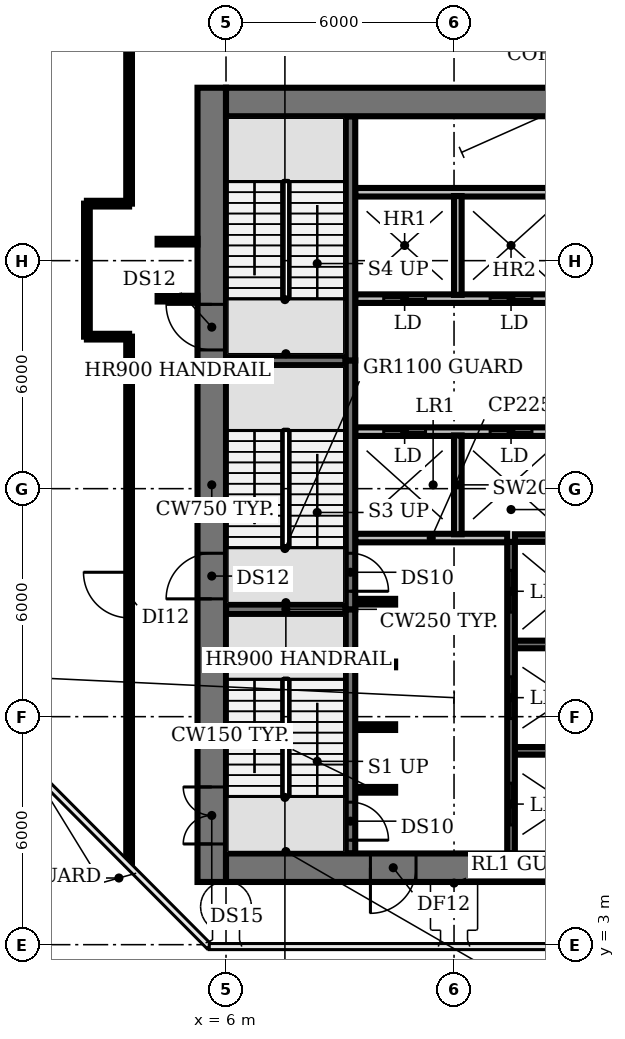
"""IFC4 building model, lengths in metres.
Left out: names, types, materials, properties, quantities, classifications, styles, units other than length and angle.
Written with IfcOpenShell. Run it as: python <this file> out.ifc"""

import sys

from ifc_helpers import new_model, si_unit, direction, frame, frame_2d, origin, place, context, subcontext, project, spatial, rectangle, extrude, element, fill, save


model = new_model("IFC4")
c1 = context("Model", 3, precision=1e-05, world=origin(), true_north=direction((0.0, 1.0)))
c2 = subcontext(c1, "Body", "Model", "MODEL_VIEW")
j1 = project(units=[si_unit("LENGTHUNIT", "METRE"), si_unit("PLANEANGLEUNIT", "RADIAN")], contexts=[c1])
p1 = place(None, origin())
s1 = spatial("IfcSite", under=j1, at=p1, CompositionType="ELEMENT")
p2 = place(p1, origin())
s2 = spatial("IfcBuilding", under=s1, at=p2, CompositionType="ELEMENT")
p3 = place(p2, frame((0.0, 0.0, 138.2)))
s3 = spatial("IfcBuildingStorey", under=s2, at=p3, CompositionType="ELEMENT", Elevation=138.2)
p4 = place(p3, frame((9.4, 7.075, 0.0), z_axis=(0.0, 0.0, 1.0), x_axis=(1.0, 0.0, 0.0)))
e1 = element("IfcWall", 1, at=p4, inside=s3, PredefinedType="SHEAR", context=c2, shape_type="SweptSolid", body=[
    extrude(rectangle(XDim=1.05, YDim=0.15, at=frame_2d((0.525, 0.0))), origin(), (0.0, 0.0, 1.0), 8.05),
])
p5 = place(p3, frame((13.6, 8.1, 0.0), z_axis=(0.0, 0.0, 1.0), x_axis=(1.0, 0.0, 0.0)))
e2 = element("IfcWall", 2, at=p5, inside=s3, PredefinedType="SHEAR", context=c2, shape_type="SweptSolid", body=[
    extrude(rectangle(XDim=2.8, YDim=0.2, at=frame_2d((1.4, 0.0))), origin(), (0.0, 0.0, 1.0), 8.05),
])
for number, where, z_axis, x_axis in (
    (3, (9.4, 8.725, 0.0), (0.0, 0.0, 1.0), (1.0, 0.0, 0.0)),
    (4, (9.4, 10.375, 0.0), (0.0, 0.0, 1.0), (1.0, 0.0, 0.0)),
):
    element("IfcWall", number, at=place(p3, frame(where, z_axis=z_axis, x_axis=x_axis)), inside=s3, PredefinedType="SHEAR", context=c2, shape_type="SweptSolid", body=[
        extrude(rectangle(XDim=1.05, YDim=0.15, at=frame_2d((0.525, 0.0))), origin(), (0.0, 0.0, 1.0), 8.05),
    ])
p6 = place(p3, frame((13.6, 10.9, 0.0), z_axis=(0.0, 0.0, 1.0), x_axis=(1.0, 0.0, 0.0)))
e5 = element("IfcWall", 5, at=p6, inside=s3, PredefinedType="SHEAR", context=c2, shape_type="SweptSolid", body=[
    extrude(rectangle(XDim=2.8, YDim=0.2, at=frame_2d((1.4, 0.0))), origin(), (0.0, 0.0, 1.0), 8.05),
])
p7 = place(p3, frame((6.0, 11.825, 0.0), z_axis=(0.0, 0.0, 1.0), x_axis=(1.0, 0.0, 0.0)))
e6 = element("IfcWall", 6, at=p7, inside=s3, PredefinedType="SHEAR", context=c2, shape_type="SweptSolid", body=[
    extrude(rectangle(XDim=3.15, YDim=0.25, at=frame_2d((1.575, 0.0))), origin(), (0.0, 0.0, 1.0), 8.05),
])
p8 = place(p3, frame((9.4, 12.025, 0.0), z_axis=(0.0, 0.0, 1.0), x_axis=(1.0, 0.0, 0.0)))
e7 = element("IfcWall", 7, at=p8, inside=s3, PredefinedType="SHEAR", context=c2, shape_type="SweptSolid", body=[
    extrude(rectangle(XDim=1.05, YDim=0.15, at=frame_2d((0.525, 0.0))), origin(), (0.0, 0.0, 1.0), 8.05),
])
p9 = place(p3, frame((9.4, 13.7, 0.0), z_axis=(0.0, 0.0, 1.0), x_axis=(1.0, 0.0, 0.0)))
e8 = element("IfcWall", 8, at=p9, inside=s3, PredefinedType="PARTITIONING", context=c2, shape_type="SweptSolid", body=[
    extrude(rectangle(XDim=4.0, YDim=0.225, at=frame_2d((2.0, 0.0))), origin(), (0.0, 0.0, 1.0), 8.05),
])
p10 = place(p3, frame((13.6, 13.7, 0.0), z_axis=(0.0, 0.0, 1.0), x_axis=(1.0, 0.0, 0.0)))
e9 = element("IfcWall", 9, at=p10, inside=s3, PredefinedType="SHEAR", context=c2, shape_type="SweptSolid", body=[
    extrude(rectangle(XDim=2.8, YDim=0.2, at=frame_2d((1.4, 0.0))), origin(), (0.0, 0.0, 1.0), 8.05),
])
p11 = place(p3, frame((9.4, 16.5, 0.0), z_axis=(0.0, 0.0, 1.0), x_axis=(1.0, 0.0, 0.0)))
e10 = element("IfcWall", 10, at=p11, inside=s3, PredefinedType="PARTITIONING", context=c2, shape_type="SweptSolid", body=[
    extrude(rectangle(XDim=14.6, YDim=0.225, at=frame_2d((7.3, 0.0))), origin(), (0.0, 0.0, 1.0), 8.05),
])
p12 = place(p11, frame((0.75, 0.0, 0.0)))
e11 = element("IfcOpeningElement", 11, at=p12, cuts=e10, PredefinedType="OPENING", context=c2, shape_type="SweptSolid", body=[
    extrude(rectangle(XDim=1.1, YDim=2.1, at=frame_2d((0.55, 1.05))), frame((0.0, 0.123, 0.0), z_axis=(0.0, -1.0, 0.0), x_axis=(1.0, 0.0, 0.0)), (0.0, 0.0, 1.0), 0.245),
])
p13 = place(p11, frame((3.55, 0.0, 0.0)))
e12 = element("IfcOpeningElement", 12, at=p13, cuts=e10, PredefinedType="OPENING", context=c2, shape_type="SweptSolid", body=[
    extrude(rectangle(XDim=1.1, YDim=2.1, at=frame_2d((0.55, 1.05))), frame((0.0, 0.123, 0.0), z_axis=(0.0, -1.0, 0.0), x_axis=(1.0, 0.0, 0.0)), (0.0, 0.0, 1.0), 0.245),
])
p14 = place(p11, frame((6.35, 0.0, 0.0)))
e13 = element("IfcOpeningElement", 13, at=p14, cuts=e10, PredefinedType="OPENING", context=c2, shape_type="SweptSolid", body=[
    extrude(rectangle(XDim=1.1, YDim=2.1, at=frame_2d((0.55, 1.05))), frame((0.0, 0.123, 0.0), z_axis=(0.0, -1.0, 0.0), x_axis=(1.0, 0.0, 0.0)), (0.0, 0.0, 1.0), 0.245),
])
p15 = place(p11, frame((9.15, 0.0, 0.0)))
e14 = element("IfcOpeningElement", 14, at=p15, cuts=e10, PredefinedType="OPENING", context=c2, shape_type="SweptSolid", body=[
    extrude(rectangle(XDim=1.1, YDim=2.1, at=frame_2d((0.55, 1.05))), frame((0.0, 0.123, 0.0), z_axis=(0.0, -1.0, 0.0), x_axis=(1.0, 0.0, 0.0)), (0.0, 0.0, 1.0), 0.245),
])
p16 = place(p11, frame((12.4, 0.0, 0.0)))
e15 = element("IfcOpeningElement", 15, at=p16, cuts=e10, PredefinedType="OPENING", context=c2, shape_type="SweptSolid", body=[
    extrude(rectangle(XDim=1.0, YDim=2.1, at=frame_2d((0.5, 1.05))), frame((0.0, 0.123, 0.0), z_axis=(0.0, -1.0, 0.0), x_axis=(1.0, 0.0, 0.0)), (0.0, 0.0, 1.0), 0.245),
])
p17 = place(p3, frame((6.0, 18.375, 0.0), z_axis=(0.0, 0.0, 1.0), x_axis=(1.0, 0.0, 0.0)))
e16 = element("IfcWall", 16, at=p17, inside=s3, PredefinedType="SHEAR", context=c2, shape_type="SweptSolid", body=[
    extrude(rectangle(XDim=3.15, YDim=0.25, at=frame_2d((1.575, 0.0))), origin(), (0.0, 0.0, 1.0), 8.05),
])
p18 = place(p3, frame((24.0, 20.0, 0.0), z_axis=(0.0, 0.0, 1.0), x_axis=(-1.0, 0.0, 0.0)))
e17 = element("IfcWall", 17, at=p18, inside=s3, PredefinedType="PARTITIONING", context=c2, shape_type="SweptSolid", body=[
    extrude(rectangle(XDim=14.6, YDim=0.225, at=frame_2d((7.3, 0.0))), origin(), (0.0, 0.0, 1.0), 8.05),
])
p19 = place(p18, frame((12.75, 0.0, 0.0)))
e18 = element("IfcOpeningElement", 18, at=p19, cuts=e17, PredefinedType="OPENING", context=c2, shape_type="SweptSolid", body=[
    extrude(rectangle(XDim=1.1, YDim=2.1, at=frame_2d((0.55, 1.05))), frame((0.0, 0.123, 0.0), z_axis=(0.0, -1.0, 0.0), x_axis=(1.0, 0.0, 0.0)), (0.0, 0.0, 1.0), 0.245),
])
p20 = place(p18, frame((9.95, 0.0, 0.0)))
e19 = element("IfcOpeningElement", 19, at=p20, cuts=e17, PredefinedType="OPENING", context=c2, shape_type="SweptSolid", body=[
    extrude(rectangle(XDim=1.1, YDim=2.1, at=frame_2d((0.55, 1.05))), frame((0.0, 0.123, 0.0), z_axis=(0.0, -1.0, 0.0), x_axis=(1.0, 0.0, 0.0)), (0.0, 0.0, 1.0), 0.245),
])
p21 = place(p18, frame((7.15, 0.0, 0.0)))
e20 = element("IfcOpeningElement", 20, at=p21, cuts=e17, PredefinedType="OPENING", context=c2, shape_type="SweptSolid", body=[
    extrude(rectangle(XDim=1.1, YDim=2.1, at=frame_2d((0.55, 1.05))), frame((0.0, 0.123, 0.0), z_axis=(0.0, -1.0, 0.0), x_axis=(1.0, 0.0, 0.0)), (0.0, 0.0, 1.0), 0.245),
])
p22 = place(p18, frame((4.35, 0.0, 0.0)))
e21 = element("IfcOpeningElement", 21, at=p22, cuts=e17, PredefinedType="OPENING", context=c2, shape_type="SweptSolid", body=[
    extrude(rectangle(XDim=1.1, YDim=2.1, at=frame_2d((0.55, 1.05))), frame((0.0, 0.123, 0.0), z_axis=(0.0, -1.0, 0.0), x_axis=(1.0, 0.0, 0.0)), (0.0, 0.0, 1.0), 0.245),
])
p23 = place(p18, frame((1.2, 0.0, 0.0)))
e22 = element("IfcOpeningElement", 22, at=p23, cuts=e17, PredefinedType="OPENING", context=c2, shape_type="SweptSolid", body=[
    extrude(rectangle(XDim=1.0, YDim=2.1, at=frame_2d((0.5, 1.05))), frame((0.0, 0.123, 0.0), z_axis=(0.0, -1.0, 0.0), x_axis=(1.0, 0.0, 0.0)), (0.0, 0.0, 1.0), 0.245),
])
p24 = place(p3, frame((9.4, 22.8, 0.0), z_axis=(0.0, 0.0, 1.0), x_axis=(1.0, 0.0, 0.0)))
e23 = element("IfcWall", 23, at=p24, inside=s3, PredefinedType="PARTITIONING", context=c2, shape_type="SweptSolid", body=[
    extrude(rectangle(XDim=14.6, YDim=0.225, at=frame_2d((7.3, 0.0))), origin(), (0.0, 0.0, 1.0), 8.05),
])
p25 = place(p3, frame((9.275, 11.825, 0.0), z_axis=(0.0, 0.0, 1.0), x_axis=(0.0, -1.0, 0.0)))
e24 = element("IfcWall", 24, at=p25, inside=s3, PredefinedType="SHEAR", context=c2, shape_type="SweptSolid", body=[
    extrude(rectangle(XDim=6.425, YDim=0.25, at=frame_2d((3.212, 0.0))), origin(), (0.0, 0.0, 1.0), 8.05),
])
p26 = place(p25, frame((5.075, 0.0, 0.0)))
e25 = element("IfcOpeningElement", 25, at=p26, cuts=e24, PredefinedType="OPENING", context=c2, shape_type="SweptSolid", body=[
    extrude(rectangle(XDim=1.0, YDim=2.1, at=frame_2d((0.5, 1.05))), frame((0.0, 0.135, 0.0), z_axis=(0.0, -1.0, 0.0), x_axis=(1.0, 0.0, 0.0)), (0.0, 0.0, 1.0), 0.27),
])
p27 = place(p3, frame((9.275, 18.375, 0.0), z_axis=(0.0, 0.0, 1.0), x_axis=(0.0, -1.0, 0.0)))
e26 = element("IfcWall", 26, at=p27, inside=s3, PredefinedType="SHEAR", context=c2, shape_type="SweptSolid", body=[
    extrude(rectangle(XDim=6.55, YDim=0.25, at=frame_2d((3.275, 0.0))), origin(), (0.0, 0.0, 1.0), 8.05),
])
p28 = place(p27, frame((5.075, 0.0, 0.0)))
e27 = element("IfcOpeningElement", 27, at=p28, cuts=e26, PredefinedType="OPENING", context=c2, shape_type="SweptSolid", body=[
    extrude(rectangle(XDim=1.0, YDim=2.1, at=frame_2d((0.5, 1.05))), frame((0.0, 0.135, 0.0), z_axis=(0.0, -1.0, 0.0), x_axis=(1.0, 0.0, 0.0)), (0.0, 0.0, 1.0), 0.27),
])
p29 = place(p3, frame((9.275, 18.375, 0.0), z_axis=(0.0, 0.0, 1.0), x_axis=(0.0, 1.0, 0.0)))
e28 = element("IfcWall", 28, at=p29, inside=s3, PredefinedType="SHEAR", context=c2, shape_type="SweptSolid", body=[
    extrude(rectangle(XDim=6.425, YDim=0.25, at=frame_2d((3.212, 0.0))), origin(), (0.0, 0.0, 1.0), 8.05),
])
for number, where, z_axis, x_axis in (
    (29, (12.1, 13.8, 0.0), (0.0, 0.0, 1.0), (0.0, 1.0, 0.0)),
    (30, (12.1, 20.1, 0.0), (0.0, 0.0, 1.0), (0.0, 1.0, 0.0)),
):
    element("IfcWall", number, at=place(p3, frame(where, z_axis=z_axis, x_axis=x_axis)), inside=s3, PredefinedType="SOLIDWALL", context=c2, shape_type="SweptSolid", body=[
        extrude(rectangle(XDim=2.6, YDim=0.2, at=frame_2d((1.3, 0.0))), origin(), (0.0, 0.0, 1.0), 8.05),
    ])
p30 = place(p3, frame((13.5, 5.4, 0.0), z_axis=(0.0, 0.0, 1.0), x_axis=(0.0, 1.0, 0.0)))
e31 = element("IfcWall", 31, at=p30, inside=s3, PredefinedType="SHEAR", context=c2, shape_type="SweptSolid", body=[
    extrude(rectangle(XDim=8.2, YDim=0.2, at=frame_2d((4.1, 0.0))), origin(), (0.0, 0.0, 1.0), 8.05),
])
p31 = place(p30, frame((0.75, 0.0, 0.0)))
e32 = element("IfcOpeningElement", 32, at=p31, cuts=e31, PredefinedType="OPENING", context=c2, shape_type="SweptSolid", body=[
    extrude(rectangle(XDim=1.1, YDim=2.1, at=frame_2d((0.55, 1.05))), frame((0.0, 0.11, 0.0), z_axis=(0.0, -1.0, 0.0), x_axis=(1.0, 0.0, 0.0)), (0.0, 0.0, 1.0), 0.22),
])
p32 = place(p30, frame((3.55, 0.0, 0.0)))
e33 = element("IfcOpeningElement", 33, at=p32, cuts=e31, PredefinedType="OPENING", context=c2, shape_type="SweptSolid", body=[
    extrude(rectangle(XDim=1.1, YDim=2.1, at=frame_2d((0.55, 1.05))), frame((0.0, 0.11, 0.0), z_axis=(0.0, -1.0, 0.0), x_axis=(1.0, 0.0, 0.0)), (0.0, 0.0, 1.0), 0.22),
])
p33 = place(p30, frame((6.35, 0.0, 0.0)))
e34 = element("IfcOpeningElement", 34, at=p33, cuts=e31, PredefinedType="OPENING", context=c2, shape_type="SweptSolid", body=[
    extrude(rectangle(XDim=1.1, YDim=2.1, at=frame_2d((0.55, 1.05))), frame((0.0, 0.11, 0.0), z_axis=(0.0, -1.0, 0.0), x_axis=(1.0, 0.0, 0.0)), (0.0, 0.0, 1.0), 0.22),
])
p34 = place(p3, frame((5.625, 4.65, 0.0), z_axis=(0.0, 0.0, 1.0), x_axis=(0.0, 1.0, 0.0)))
e35 = element("IfcWall", 35, at=p34, inside=s3, PredefinedType="SHEAR", context=c2, shape_type="SweptSolid", body=[
    extrude(rectangle(XDim=20.9, YDim=0.75, at=frame_2d((10.45, 0.0))), origin(), (0.0, 0.0, 1.0), 8.05),
])
p35 = place(p34, frame((1.0, 0.0, 0.0)))
e36 = element("IfcOpeningElement", 36, at=p35, cuts=e35, PredefinedType="OPENING", context=c2, shape_type="SweptSolid", body=[
    extrude(rectangle(XDim=1.5, YDim=2.1, at=frame_2d((0.75, 1.05))), frame((0.0, 0.385, 0.0), z_axis=(0.0, -1.0, 0.0), x_axis=(1.0, 0.0, 0.0)), (0.0, 0.0, 1.0), 0.77),
])
p36 = place(p34, frame((7.45, 0.0, 0.0)))
e37 = element("IfcOpeningElement", 37, at=p36, cuts=e35, PredefinedType="OPENING", context=c2, shape_type="SweptSolid", body=[
    extrude(rectangle(XDim=1.2, YDim=2.1, at=frame_2d((0.6, 1.05))), frame((0.0, 0.385, 0.0), z_axis=(0.0, -1.0, 0.0), x_axis=(1.0, 0.0, 0.0)), (0.0, 0.0, 1.0), 0.77),
])
p37 = place(p34, frame((14.0, 0.0, 0.0)))
e38 = element("IfcOpeningElement", 38, at=p37, cuts=e35, PredefinedType="OPENING", context=c2, shape_type="SweptSolid", body=[
    extrude(rectangle(XDim=1.2, YDim=2.1, at=frame_2d((0.6, 1.05))), frame((0.0, 0.385, 0.0), z_axis=(0.0, -1.0, 0.0), x_axis=(1.0, 0.0, 0.0)), (0.0, 0.0, 1.0), 0.77),
])
p38 = place(p3, frame((24.0, 5.025, 0.0), z_axis=(0.0, 0.0, 1.0), x_axis=(-1.0, 0.0, 0.0)))
e39 = element("IfcWall", 39, at=p38, inside=s3, PredefinedType="SHEAR", context=c2, shape_type="SweptSolid", body=[
    extrude(rectangle(XDim=18.0, YDim=0.75, at=frame_2d((9.0, 0.0))), origin(), (0.0, 0.0, 1.0), 8.05),
])
p39 = place(p38, frame((13.0, 0.0, 0.0)))
e40 = element("IfcOpeningElement", 40, at=p39, cuts=e39, PredefinedType="OPENING", context=c2, shape_type="SweptSolid", body=[
    extrude(rectangle(XDim=1.2, YDim=2.1, at=frame_2d((0.6, 1.05))), frame((0.0, 0.385, 0.0), z_axis=(0.0, -1.0, 0.0), x_axis=(1.0, 0.0, 0.0)), (0.0, 0.0, 1.0), 0.77),
])
p40 = place(p38, frame((3.85, 0.0, 0.0)))
e41 = element("IfcOpeningElement", 41, at=p40, cuts=e39, PredefinedType="OPENING", context=c2, shape_type="SweptSolid", body=[
    extrude(rectangle(XDim=1.0, YDim=2.1, at=frame_2d((0.5, 1.05))), frame((0.0, 0.385, 0.0), z_axis=(0.0, -1.0, 0.0), x_axis=(1.0, 0.0, 0.0)), (0.0, 0.0, 1.0), 0.77),
])
p41 = place(p3, frame((6.0, 25.175, 0.0), z_axis=(0.0, 0.0, 1.0), x_axis=(1.0, 0.0, 0.0)))
e42 = element("IfcWall", 42, at=p41, inside=s3, PredefinedType="SHEAR", context=c2, shape_type="SweptSolid", body=[
    extrude(rectangle(XDim=18.0, YDim=0.75, at=frame_2d((9.0, 0.0))), origin(), (0.0, 0.0, 1.0), 8.05),
])
p42 = place(p3, frame((2.34, 19.0, 0.0), z_axis=(0.0, 0.0, 1.0), x_axis=(0.0, 1.0, 0.0)))
e43 = element("IfcWall", 43, at=p42, inside=s3, PredefinedType="PARTITIONING", context=c2, shape_type="SweptSolid", body=[
    extrude(rectangle(XDim=3.5, YDim=0.15, at=frame_2d((1.75, 0.0))), origin(), (0.0, 0.0, 1.0), 6.33),
])
for number, where, z_axis, x_axis in (
    (44, (2.34, 19.0, 0.0), (0.0, 0.0, 1.0), (1.0, 0.0, 0.0)),
    (45, (2.34, 22.5, 0.0), (0.0, 0.0, 1.0), (1.0, 0.0, 0.0)),
):
    element("IfcWall", number, at=place(p3, frame(where, z_axis=z_axis, x_axis=x_axis)), inside=s3, PredefinedType="PARTITIONING", context=c2, shape_type="SweptSolid", body=[
        extrude(rectangle(XDim=1.11, YDim=0.15, at=frame_2d((0.555, 0.0))), origin(), (0.0, 0.0, 1.0), 6.33),
    ])
p43 = place(p3, frame((3.45, 5.14, 0.0), z_axis=(0.0, 0.0, 1.0), x_axis=(0.0, 1.0, 0.0)))
e46 = element("IfcWall", 46, at=p43, inside=s3, PredefinedType="PARTITIONING", context=c2, shape_type="SweptSolid", body=[
    extrude(rectangle(XDim=13.86, YDim=0.15, at=frame_2d((6.93, 0.0))), origin(), (0.0, 0.0, 1.0), 6.33),
])
p44 = place(p43, frame((6.46, 0.0, 0.0)))
e47 = element("IfcOpeningElement", 47, at=p44, cuts=e46, PredefinedType="OPENING", context=c2, shape_type="SweptSolid", body=[
    extrude(rectangle(XDim=1.2, YDim=2.1, at=frame_2d((0.6, 1.05))), frame((0.0, 0.085, 0.0), z_axis=(0.0, -1.0, 0.0), x_axis=(1.0, 0.0, 0.0)), (0.0, 0.0, 1.0), 0.17),
])
p45 = place(p3, frame((3.45, 22.5, 0.0), z_axis=(0.0, 0.0, 1.0), x_axis=(0.0, 1.0, 0.0)))
e48 = element("IfcWall", 48, at=p45, inside=s3, PredefinedType="PARTITIONING", context=c2, shape_type="SweptSolid", body=[
    extrude(rectangle(XDim=4.85, YDim=0.15, at=frame_2d((2.425, 0.0))), origin(), (0.0, 0.0, 1.0), 6.33),
])
for number, where, z_axis, x_axis in (
    (49, (4.2, 20.0, 0.0), (0.0, 0.0, 1.0), (1.0, 0.0, 0.0)),
    (50, (4.2, 21.5, 0.0), (0.0, 0.0, 1.0), (1.0, 0.0, 0.0)),
):
    element("IfcWall", number, at=place(p3, frame(where, z_axis=z_axis, x_axis=x_axis)), inside=s3, PredefinedType="PARTITIONING", context=c2, shape_type="SweptSolid", body=[
        extrude(rectangle(XDim=1.05, YDim=0.15, at=frame_2d((0.525, 0.0))), origin(), (0.0, 0.0, 1.0), 6.33),
    ])
p46 = place(p12, origin())
e51 = element("IfcDoor", 51, at=p46, inside=s3, OperationType="DOUBLE_DOOR_SLIDING", PredefinedType="DOOR", context=c2, shape_type="SweptSolid", body=[
    extrude(rectangle(XDim=1.1, YDim=2.1, at=frame_2d((0.55, 1.05))), frame((0.0, 0.025, 0.0), z_axis=(0.0, -1.0, 0.0), x_axis=(1.0, 0.0, 0.0)), (0.0, 0.0, 1.0), 0.05),
])
fill(e11, e51)
p47 = place(p13, origin())
e52 = element("IfcDoor", 52, at=p47, inside=s3, OperationType="DOUBLE_DOOR_SLIDING", PredefinedType="DOOR", context=c2, shape_type="SweptSolid", body=[
    extrude(rectangle(XDim=1.1, YDim=2.1, at=frame_2d((0.55, 1.05))), frame((0.0, 0.025, 0.0), z_axis=(0.0, -1.0, 0.0), x_axis=(1.0, 0.0, 0.0)), (0.0, 0.0, 1.0), 0.05),
])
fill(e12, e52)
p48 = place(p19, origin())
e53 = element("IfcDoor", 53, at=p48, inside=s3, OperationType="DOUBLE_DOOR_SLIDING", PredefinedType="DOOR", context=c2, shape_type="SweptSolid", body=[
    extrude(rectangle(XDim=1.1, YDim=2.1, at=frame_2d((0.55, 1.05))), frame((0.0, 0.025, 0.0), z_axis=(0.0, -1.0, 0.0), x_axis=(1.0, 0.0, 0.0)), (0.0, 0.0, 1.0), 0.05),
])
fill(e18, e53)
p49 = place(p20, origin())
e54 = element("IfcDoor", 54, at=p49, inside=s3, OperationType="DOUBLE_DOOR_SLIDING", PredefinedType="DOOR", context=c2, shape_type="SweptSolid", body=[
    extrude(rectangle(XDim=1.1, YDim=2.1, at=frame_2d((0.55, 1.05))), frame((0.0, 0.025, 0.0), z_axis=(0.0, -1.0, 0.0), x_axis=(1.0, 0.0, 0.0)), (0.0, 0.0, 1.0), 0.05),
])
fill(e19, e54)
p50 = place(p26, origin())
e55 = element("IfcDoor", 55, at=p50, inside=s3, OperationType="SINGLE_SWING_RIGHT", PredefinedType="DOOR", context=c2, shape_type="SweptSolid", body=[
    extrude(rectangle(XDim=1.0, YDim=2.1, at=frame_2d((0.5, 1.05))), frame((0.0, 0.025, 0.0), z_axis=(0.0, -1.0, 0.0), x_axis=(1.0, 0.0, 0.0)), (0.0, 0.0, 1.0), 0.05),
])
fill(e25, e55)
p51 = place(p28, origin())
e56 = element("IfcDoor", 56, at=p51, inside=s3, OperationType="SINGLE_SWING_RIGHT", PredefinedType="DOOR", context=c2, shape_type="SweptSolid", body=[
    extrude(rectangle(XDim=1.0, YDim=2.1, at=frame_2d((0.5, 1.05))), frame((0.0, 0.025, 0.0), z_axis=(0.0, -1.0, 0.0), x_axis=(1.0, 0.0, 0.0)), (0.0, 0.0, 1.0), 0.05),
])
fill(e27, e56)
p52 = place(p31, origin())
e57 = element("IfcDoor", 57, at=p52, inside=s3, OperationType="DOUBLE_DOOR_SLIDING", PredefinedType="DOOR", context=c2, shape_type="SweptSolid", body=[
    extrude(rectangle(XDim=1.1, YDim=2.1, at=frame_2d((0.55, 1.05))), frame((0.0, 0.025, 0.0), z_axis=(0.0, -1.0, 0.0), x_axis=(1.0, 0.0, 0.0)), (0.0, 0.0, 1.0), 0.05),
])
fill(e32, e57)
p53 = place(p32, origin())
e58 = element("IfcDoor", 58, at=p53, inside=s3, OperationType="DOUBLE_DOOR_SLIDING", PredefinedType="DOOR", context=c2, shape_type="SweptSolid", body=[
    extrude(rectangle(XDim=1.1, YDim=2.1, at=frame_2d((0.55, 1.05))), frame((0.0, 0.025, 0.0), z_axis=(0.0, -1.0, 0.0), x_axis=(1.0, 0.0, 0.0)), (0.0, 0.0, 1.0), 0.05),
])
fill(e33, e58)
p54 = place(p33, origin())
e59 = element("IfcDoor", 59, at=p54, inside=s3, OperationType="DOUBLE_DOOR_SLIDING", PredefinedType="DOOR", context=c2, shape_type="SweptSolid", body=[
    extrude(rectangle(XDim=1.1, YDim=2.1, at=frame_2d((0.55, 1.05))), frame((0.0, 0.025, 0.0), z_axis=(0.0, -1.0, 0.0), x_axis=(1.0, 0.0, 0.0)), (0.0, 0.0, 1.0), 0.05),
])
fill(e34, e59)
p55 = place(p35, origin())
e60 = element("IfcDoor", 60, at=p55, inside=s3, OperationType="DOUBLE_DOOR_SINGLE_SWING", PredefinedType="DOOR", context=c2, shape_type="SweptSolid", body=[
    extrude(rectangle(XDim=1.5, YDim=2.1, at=frame_2d((0.75, 1.05))), frame((0.0, 0.025, 0.0), z_axis=(0.0, -1.0, 0.0), x_axis=(1.0, 0.0, 0.0)), (0.0, 0.0, 1.0), 0.05),
])
fill(e36, e60)
p56 = place(p36, origin())
e61 = element("IfcDoor", 61, at=p56, inside=s3, OperationType="SINGLE_SWING_LEFT", PredefinedType="DOOR", context=c2, shape_type="SweptSolid", body=[
    extrude(rectangle(XDim=1.2, YDim=2.1, at=frame_2d((0.6, 1.05))), frame((0.0, 0.025, 0.0), z_axis=(0.0, -1.0, 0.0), x_axis=(1.0, 0.0, 0.0)), (0.0, 0.0, 1.0), 0.05),
])
fill(e37, e61)
p57 = place(p37, origin())
e62 = element("IfcDoor", 62, at=p57, inside=s3, OperationType="SINGLE_SWING_RIGHT", PredefinedType="DOOR", context=c2, shape_type="SweptSolid", body=[
    extrude(rectangle(XDim=1.2, YDim=2.1, at=frame_2d((0.6, 1.05))), frame((0.0, 0.025, 0.0), z_axis=(0.0, -1.0, 0.0), x_axis=(1.0, 0.0, 0.0)), (0.0, 0.0, 1.0), 0.05),
])
fill(e38, e62)
p58 = place(p39, origin())
e63 = element("IfcDoor", 63, at=p58, inside=s3, OperationType="SINGLE_SWING_RIGHT", PredefinedType="DOOR", context=c2, shape_type="SweptSolid", body=[
    extrude(rectangle(XDim=1.2, YDim=2.1, at=frame_2d((0.6, 1.05))), frame((0.0, 0.025, 0.0), z_axis=(0.0, -1.0, 0.0), x_axis=(1.0, 0.0, 0.0)), (0.0, 0.0, 1.0), 0.05),
])
fill(e40, e63)
p59 = place(p44, origin())
e64 = element("IfcDoor", 64, at=p59, inside=s3, OperationType="SINGLE_SWING_RIGHT", PredefinedType="DOOR", context=c2, shape_type="SweptSolid", body=[
    extrude(rectangle(XDim=1.2, YDim=2.1, at=frame_2d((0.6, 1.05))), frame((0.0, 0.025, 0.0), z_axis=(0.0, -1.0, 0.0), x_axis=(1.0, 0.0, 0.0)), (0.0, 0.0, 1.0), 0.05),
])
fill(e47, e64)
save(model, sys.argv[1])
